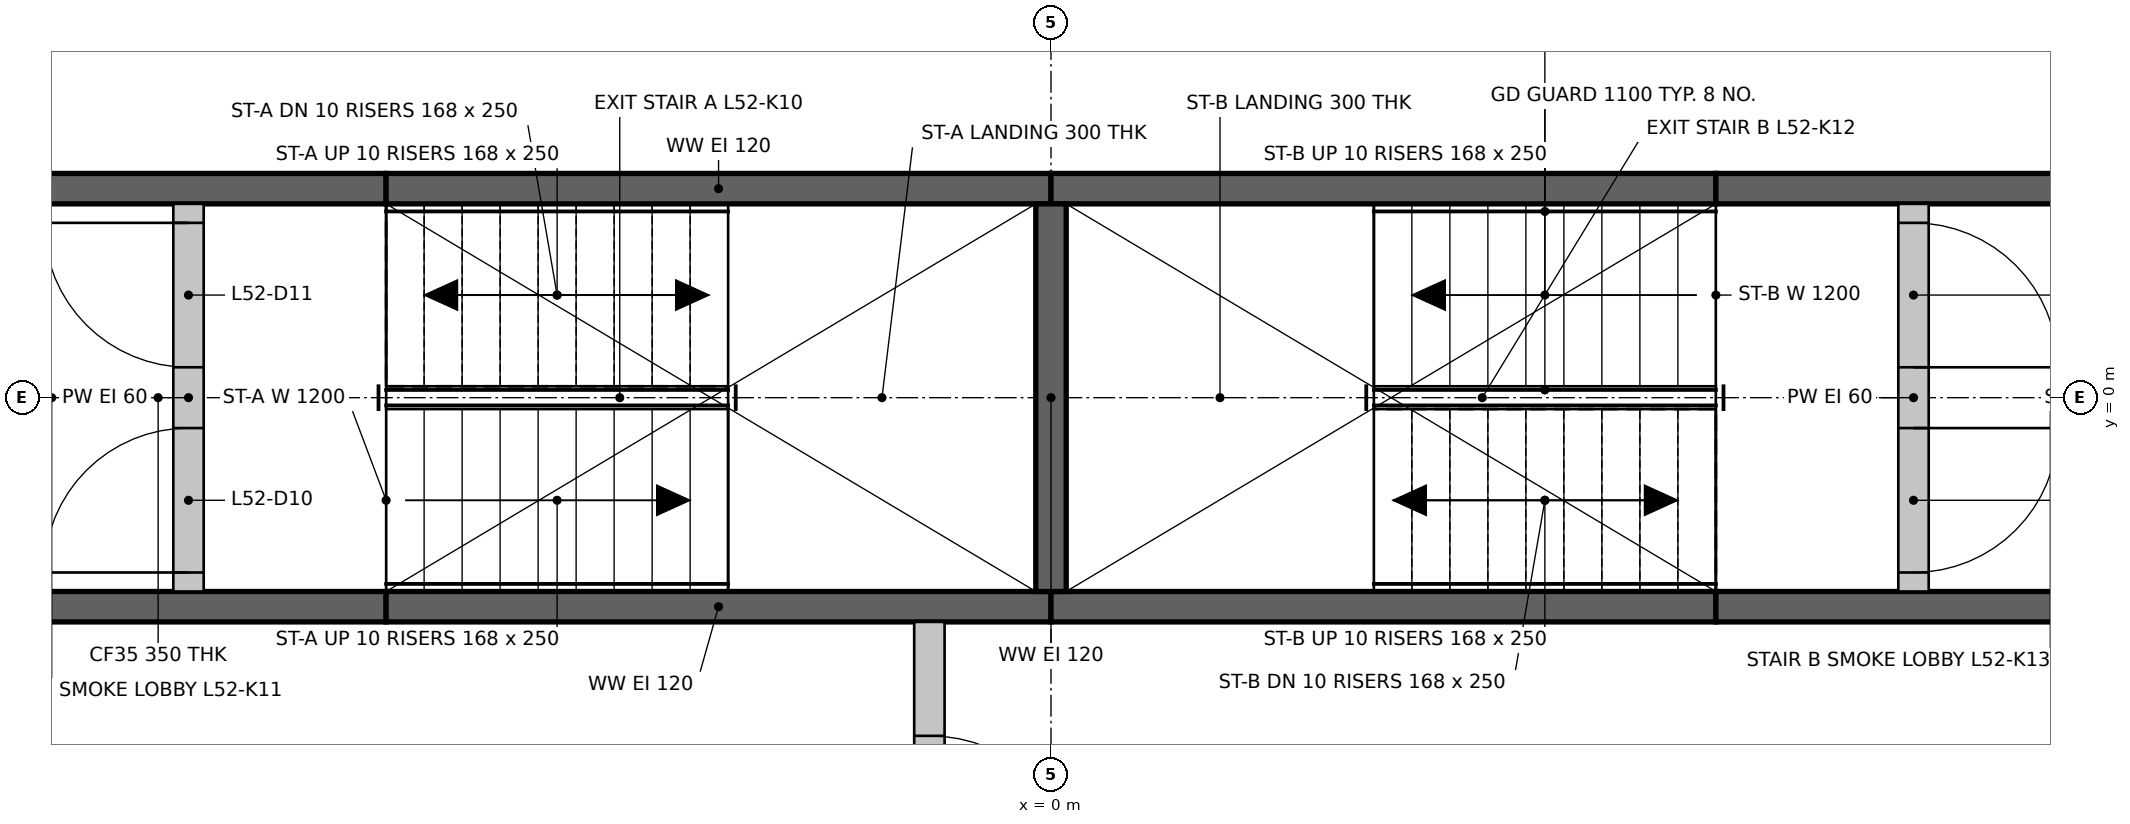
"""IFC4 building model, lengths in metres.
Left out: names, types, materials, properties, quantities, classifications, styles, units other than length and angle.
Written with IfcOpenShell. Run it as: python <this file> out.ifc"""

import sys

from ifc_helpers import new_model, si_unit, direction, frame, frame_2d, origin, place, context, subcontext, project, spatial, rectangle, extrude, element, fill, save


model = new_model("IFC4")
c1 = context("Model", 3, precision=1e-05, world=origin(), true_north=direction((0.0, 1.0)))
c2 = subcontext(c1, "Body", "Model", "MODEL_VIEW")
j1 = project(units=[si_unit("LENGTHUNIT", "METRE"), si_unit("PLANEANGLEUNIT", "RADIAN")], contexts=[c1])
p1 = place(None, origin())
s1 = spatial("IfcSite", under=j1, at=p1, CompositionType="ELEMENT")
p2 = place(p1, origin())
s2 = spatial("IfcBuilding", under=s1, at=p2, CompositionType="ELEMENT")
p3 = place(p2, frame((0.0, 0.0, 194.35)))
s3 = spatial("IfcBuildingStorey", under=s2, at=p3, CompositionType="ELEMENT", Elevation=194.35)
p4 = place(p3, frame((-7.374, -1.375, 0.0), z_axis=(0.0, 0.0, 1.0), x_axis=(1.0, 0.0, 0.0)))
e1 = element("IfcWall", 1, at=p4, inside=s3, PredefinedType="SHEAR", context=c2, shape_type="SweptSolid", body=[
    extrude(rectangle(XDim=3.0, YDim=0.2, at=frame_2d((1.5, 0.0))), origin(), (0.0, 0.0, 1.0), 3.0),
])
for number, where, z_axis, x_axis in (
    (2, (-4.374, -1.375, 0.0), (0.0, 0.0, 1.0), (1.0, 0.0, 0.0)),
    (3, (0.0, -1.375, 0.0), (0.0, 0.0, 1.0), (1.0, 0.0, 0.0)),
):
    element("IfcWall", number, at=place(p3, frame(where, z_axis=z_axis, x_axis=x_axis)), inside=s3, PredefinedType="SHEAR", context=c2, shape_type="SweptSolid", body=[
        extrude(rectangle(XDim=4.374, YDim=0.2, at=frame_2d((2.187, 0.0))), origin(), (0.0, 0.0, 1.0), 3.0),
    ])
for number, where, z_axis, x_axis in (
    (4, (4.374, -1.375, 0.0), (0.0, 0.0, 1.0), (1.0, 0.0, 0.0)),
    (5, (-7.374, 1.375, 0.0), (0.0, 0.0, 1.0), (1.0, 0.0, 0.0)),
):
    element("IfcWall", number, at=place(p3, frame(where, z_axis=z_axis, x_axis=x_axis)), inside=s3, PredefinedType="SHEAR", context=c2, shape_type="SweptSolid", body=[
        extrude(rectangle(XDim=3.0, YDim=0.2, at=frame_2d((1.5, 0.0))), origin(), (0.0, 0.0, 1.0), 3.0),
    ])
for number, where, z_axis, x_axis in (
    (6, (-4.374, 1.375, 0.0), (0.0, 0.0, 1.0), (1.0, 0.0, 0.0)),
    (7, (0.0, 1.375, 0.0), (0.0, 0.0, 1.0), (1.0, 0.0, 0.0)),
):
    element("IfcWall", number, at=place(p3, frame(where, z_axis=z_axis, x_axis=x_axis)), inside=s3, PredefinedType="SHEAR", context=c2, shape_type="SweptSolid", body=[
        extrude(rectangle(XDim=4.374, YDim=0.2, at=frame_2d((2.187, 0.0))), origin(), (0.0, 0.0, 1.0), 3.0),
    ])
p5 = place(p3, frame((4.374, 1.375, 0.0), z_axis=(0.0, 0.0, 1.0), x_axis=(1.0, 0.0, 0.0)))
e8 = element("IfcWall", 8, at=p5, inside=s3, PredefinedType="SHEAR", context=c2, shape_type="SweptSolid", body=[
    extrude(rectangle(XDim=3.0, YDim=0.2, at=frame_2d((1.5, 0.0))), origin(), (0.0, 0.0, 1.0), 3.0),
])
p6 = place(p3, frame((0.0, -1.275, 0.0), z_axis=(0.0, 0.0, 1.0), x_axis=(0.0, 1.0, 0.0)))
e9 = element("IfcWall", 9, at=p6, inside=s3, PredefinedType="SHEAR", context=c2, shape_type="SweptSolid", body=[
    extrude(rectangle(XDim=2.55, YDim=0.2, at=frame_2d((1.275, 0.0))), origin(), (0.0, 0.0, 1.0), 3.0),
])
p7 = place(p3, frame((-0.8, -3.974, 0.0), z_axis=(0.0, 0.0, 1.0), x_axis=(0.0, 1.0, 0.0)))
e10 = element("IfcWall", 10, at=p7, inside=s3, PredefinedType="PARTITIONING", context=c2, shape_type="SweptSolid", body=[
    extrude(rectangle(XDim=2.499, YDim=0.2, at=frame_2d((1.25, 0.0))), origin(), (0.0, 0.0, 1.0), 3.0),
])
p8 = place(p7, frame((0.75, 0.0, 0.0)))
e11 = element("IfcOpeningElement", 11, at=p8, cuts=e10, PredefinedType="OPENING", context=c2, shape_type="SweptSolid", body=[
    extrude(rectangle(XDim=1.0, YDim=2.1, at=frame_2d((0.5, 1.05))), frame((0.0, 0.11, 0.0), z_axis=(0.0, -1.0, 0.0), x_axis=(1.0, 0.0, 0.0)), (0.0, 0.0, 1.0), 0.22),
])
p9 = place(p3, frame((-5.674, -1.275, 0.0), z_axis=(0.0, 0.0, 1.0), x_axis=(0.0, 1.0, 0.0)))
e12 = element("IfcWall", 12, at=p9, inside=s3, PredefinedType="PARTITIONING", context=c2, shape_type="SweptSolid", body=[
    extrude(rectangle(XDim=2.55, YDim=0.2, at=frame_2d((1.275, 0.0))), origin(), (0.0, 0.0, 1.0), 3.0),
])
p10 = place(p9, frame((0.125, 0.0, 0.0)))
e13 = element("IfcOpeningElement", 13, at=p10, cuts=e12, PredefinedType="OPENING", context=c2, shape_type="SweptSolid", body=[
    extrude(rectangle(XDim=0.95, YDim=2.1, at=frame_2d((0.475, 1.05))), frame((0.0, 0.11, 0.0), z_axis=(0.0, -1.0, 0.0), x_axis=(1.0, 0.0, 0.0)), (0.0, 0.0, 1.0), 0.22),
])
p11 = place(p9, frame((1.475, 0.0, 0.0)))
e14 = element("IfcOpeningElement", 14, at=p11, cuts=e12, PredefinedType="OPENING", context=c2, shape_type="SweptSolid", body=[
    extrude(rectangle(XDim=0.95, YDim=2.1, at=frame_2d((0.475, 1.05))), frame((0.0, 0.11, 0.0), z_axis=(0.0, -1.0, 0.0), x_axis=(1.0, 0.0, 0.0)), (0.0, 0.0, 1.0), 0.22),
])
p12 = place(p3, frame((5.674, -1.275, 0.0), z_axis=(0.0, 0.0, 1.0), x_axis=(0.0, 1.0, 0.0)))
e15 = element("IfcWall", 15, at=p12, inside=s3, PredefinedType="PARTITIONING", context=c2, shape_type="SweptSolid", body=[
    extrude(rectangle(XDim=2.55, YDim=0.2, at=frame_2d((1.275, 0.0))), origin(), (0.0, 0.0, 1.0), 3.0),
])
p13 = place(p12, frame((0.125, 0.0, 0.0)))
e16 = element("IfcOpeningElement", 16, at=p13, cuts=e15, PredefinedType="OPENING", context=c2, shape_type="SweptSolid", body=[
    extrude(rectangle(XDim=0.95, YDim=2.1, at=frame_2d((0.475, 1.05))), frame((0.0, 0.11, 0.0), z_axis=(0.0, -1.0, 0.0), x_axis=(1.0, 0.0, 0.0)), (0.0, 0.0, 1.0), 0.22),
])
p14 = place(p12, frame((1.475, 0.0, 0.0)))
e17 = element("IfcOpeningElement", 17, at=p14, cuts=e15, PredefinedType="OPENING", context=c2, shape_type="SweptSolid", body=[
    extrude(rectangle(XDim=0.95, YDim=2.1, at=frame_2d((0.475, 1.05))), frame((0.0, 0.11, 0.0), z_axis=(0.0, -1.0, 0.0), x_axis=(1.0, 0.0, 0.0)), (0.0, 0.0, 1.0), 0.22),
])
p15 = place(p10, origin())
e18 = element("IfcDoor", 18, at=p15, inside=s3, OperationType="SINGLE_SWING_LEFT", PredefinedType="DOOR", context=c2, shape_type="SweptSolid", body=[
    extrude(rectangle(XDim=0.95, YDim=2.1, at=frame_2d((0.475, 1.05))), frame((0.0, 0.025, 0.0), z_axis=(0.0, -1.0, 0.0), x_axis=(1.0, 0.0, 0.0)), (0.0, 0.0, 1.0), 0.05),
])
fill(e13, e18)
p16 = place(p11, origin())
e19 = element("IfcDoor", 19, at=p16, inside=s3, OperationType="SINGLE_SWING_RIGHT", PredefinedType="DOOR", context=c2, shape_type="SweptSolid", body=[
    extrude(rectangle(XDim=0.95, YDim=2.1, at=frame_2d((0.475, 1.05))), frame((0.0, 0.025, 0.0), z_axis=(0.0, -1.0, 0.0), x_axis=(1.0, 0.0, 0.0)), (0.0, 0.0, 1.0), 0.05),
])
fill(e14, e19)
p17 = place(p13, frame((0.95, 0.0, 0.0), z_axis=(0.0, 0.0, 1.0), x_axis=(-1.0, 0.0, 0.0)))
e20 = element("IfcDoor", 20, at=p17, inside=s3, OperationType="SINGLE_SWING_RIGHT", PredefinedType="DOOR", context=c2, shape_type="SweptSolid", body=[
    extrude(rectangle(XDim=0.95, YDim=2.1, at=frame_2d((0.475, 1.05))), frame((0.0, 0.025, 0.0), z_axis=(0.0, -1.0, 0.0), x_axis=(1.0, 0.0, 0.0)), (0.0, 0.0, 1.0), 0.05),
])
fill(e16, e20)
p18 = place(p14, frame((0.95, 0.0, 0.0), z_axis=(0.0, 0.0, 1.0), x_axis=(-1.0, 0.0, 0.0)))
e21 = element("IfcDoor", 21, at=p18, inside=s3, OperationType="SINGLE_SWING_LEFT", PredefinedType="DOOR", context=c2, shape_type="SweptSolid", body=[
    extrude(rectangle(XDim=0.95, YDim=2.1, at=frame_2d((0.475, 1.05))), frame((0.0, 0.025, 0.0), z_axis=(0.0, -1.0, 0.0), x_axis=(1.0, 0.0, 0.0)), (0.0, 0.0, 1.0), 0.05),
])
fill(e17, e21)
p19 = place(p8, frame((1.0, 0.0, 0.0), z_axis=(0.0, 0.0, 1.0), x_axis=(-1.0, 0.0, 0.0)))
e22 = element("IfcDoor", 22, at=p19, inside=s3, OperationType="SINGLE_SWING_LEFT", PredefinedType="DOOR", context=c2, shape_type="SweptSolid", body=[
    extrude(rectangle(XDim=1.0, YDim=2.1, at=frame_2d((0.5, 1.05))), frame((0.0, 0.025, 0.0), z_axis=(0.0, -1.0, 0.0), x_axis=(1.0, 0.0, 0.0)), (0.0, 0.0, 1.0), 0.05),
])
fill(e11, e22)
save(model, sys.argv[1])
